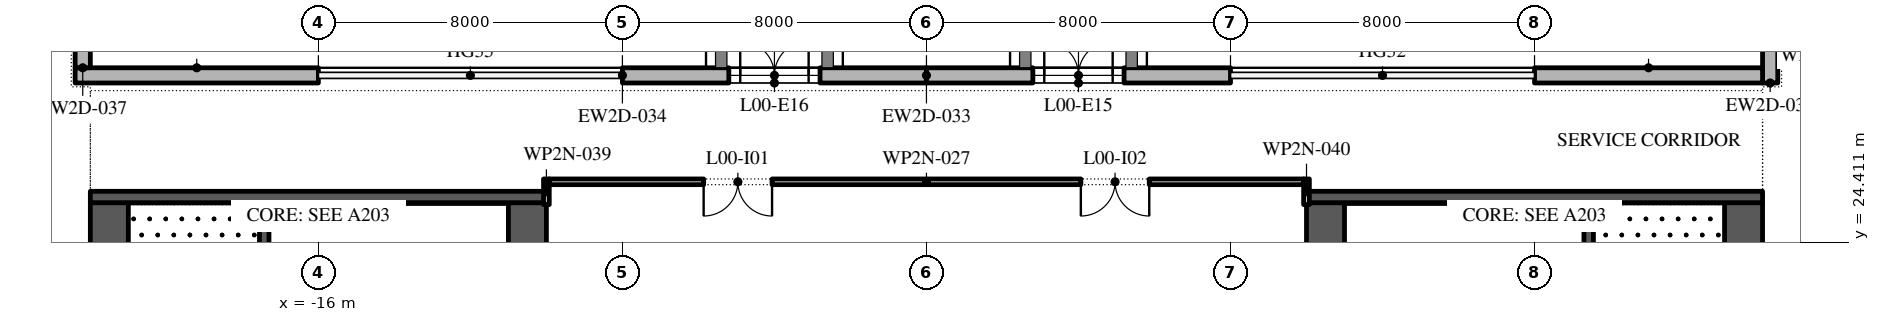
"""IFC4 building model, lengths in metres.
Left out: names, types, materials, properties, quantities, classifications, styles, units other than length and angle.
Written with IfcOpenShell. Run it as: python <this file> out.ifc"""

import sys

from ifc_helpers import new_model, si_unit, direction, frame, frame_2d, origin, place, context, subcontext, project, spatial, polyline, rectangle, outline, extrude, element, fill, save


model = new_model("IFC4")
c1 = context("Model", 3, precision=1e-05, world=origin(), true_north=direction((0.0, 1.0)))
c2 = subcontext(c1, "Body", "Model", "MODEL_VIEW")
j1 = project(units=[si_unit("LENGTHUNIT", "METRE"), si_unit("PLANEANGLEUNIT", "RADIAN")], contexts=[c1])
p1 = place(None, origin())
s1 = spatial("IfcSite", under=j1, at=p1, CompositionType="ELEMENT")
p2 = place(p1, origin())
s2 = spatial("IfcBuilding", under=s1, at=p2, CompositionType="ELEMENT")
p3 = place(p2, origin())
s3 = spatial("IfcBuildingStorey", under=s2, at=p3, CompositionType="ELEMENT", Elevation=0.0)
p4 = place(p3, frame((22.2, 32.0, 0.0), z_axis=(0.0, 0.0, 1.0), x_axis=(0.0, -1.0, 0.0)))
e1 = element("IfcWall", 1, at=p4, inside=s3, PredefinedType="STANDARD", context=c2, shape_type="SweptSolid", body=[
    extrude(rectangle(XDim=3.4, YDim=0.4, at=frame_2d((1.7, 0.0))), origin(), (0.0, 0.0, 1.0), 7.7),
])
p5 = place(p3, frame((22.0, 28.8, 0.0), z_axis=(0.0, 0.0, 1.0), x_axis=(-1.0, 0.0, 0.0)))
e2 = element("IfcWall", 2, at=p5, inside=s3, PredefinedType="STANDARD", context=c2, shape_type="SweptSolid", body=[
    extrude(rectangle(XDim=6.0, YDim=0.4, at=frame_2d((3.0, 0.0))), origin(), (0.0, 0.0, 1.0), 7.7),
])
p6 = place(p3, frame((8.0, 28.8, 0.0), z_axis=(0.0, 0.0, 1.0), x_axis=(-1.0, 0.0, 0.0)))
e3 = element("IfcWall", 3, at=p6, inside=s3, PredefinedType="STANDARD", context=c2, shape_type="SweptSolid", body=[
    extrude(rectangle(XDim=8.0, YDim=0.4, at=frame_2d((4.0, 0.0))), origin(), (0.0, 0.0, 1.0), 7.7),
])
p7 = place(p6, frame((3.1, 0.0, 0.0)))
e4 = element("IfcOpeningElement", 4, at=p7, cuts=e3, PredefinedType="OPENING", context=c2, shape_type="SweptSolid", body=[
    extrude(rectangle(XDim=1.8, YDim=2.7, at=frame_2d((0.9, 1.35))), frame((0.0, 0.21, 0.0), z_axis=(0.0, -1.0, 0.0), x_axis=(1.0, 0.0, 0.0)), (0.0, 0.0, 1.0), 0.42),
])
p8 = place(p6, frame((2.8, 0.0, 3.7)))
e5 = element("IfcOpeningElement", 5, at=p8, cuts=e3, PredefinedType="OPENING", context=c2, shape_type="SweptSolid", body=[
    extrude(outline(polyline([(0.0, 0.0), (2.4, 0.0), (2.4, 1.55), (2.378, 1.812), (2.314, 2.068), (2.208, 2.309), (2.065, 2.53), (1.887, 2.724), (1.68, 2.887), (1.449, 3.013), (1.2, 3.1), (0.951, 3.013), (0.72, 2.887), (0.513, 2.724), (0.335, 2.53), (0.191, 2.309), (0.086, 2.068), (0.022, 1.812), (0.0, 1.55), (0.0, 0.0)])), frame((0.0, 0.21, 0.0), z_axis=(0.0, -1.0, 0.0), x_axis=(1.0, 0.0, 0.0)), (0.0, 0.0, 1.0), 0.42),
])
p9 = place(p3, frame((0.0, 28.8, 0.0), z_axis=(0.0, 0.0, 1.0), x_axis=(-1.0, 0.0, 0.0)))
e6 = element("IfcWall", 6, at=p9, inside=s3, PredefinedType="STANDARD", context=c2, shape_type="SweptSolid", body=[
    extrude(rectangle(XDim=8.0, YDim=0.4, at=frame_2d((4.0, 0.0))), origin(), (0.0, 0.0, 1.0), 7.7),
])
p10 = place(p9, frame((3.1, 0.0, 0.0)))
e7 = element("IfcOpeningElement", 7, at=p10, cuts=e6, PredefinedType="OPENING", context=c2, shape_type="SweptSolid", body=[
    extrude(rectangle(XDim=1.8, YDim=2.7, at=frame_2d((0.9, 1.35))), frame((0.0, 0.21, 0.0), z_axis=(0.0, -1.0, 0.0), x_axis=(1.0, 0.0, 0.0)), (0.0, 0.0, 1.0), 0.42),
])
p11 = place(p9, frame((2.8, 0.0, 3.7)))
e8 = element("IfcOpeningElement", 8, at=p11, cuts=e6, PredefinedType="OPENING", context=c2, shape_type="SweptSolid", body=[
    extrude(outline(polyline([(0.0, 0.0), (2.4, 0.0), (2.4, 1.55), (2.378, 1.812), (2.314, 2.068), (2.208, 2.309), (2.065, 2.53), (1.887, 2.724), (1.68, 2.887), (1.449, 3.013), (1.2, 3.1), (0.951, 3.013), (0.72, 2.887), (0.513, 2.724), (0.335, 2.53), (0.191, 2.309), (0.086, 2.068), (0.022, 1.812), (0.0, 1.55), (0.0, 0.0)])), frame((0.0, 0.21, 0.0), z_axis=(0.0, -1.0, 0.0), x_axis=(1.0, 0.0, 0.0)), (0.0, 0.0, 1.0), 0.42),
])
p12 = place(p3, frame((-16.0, 28.8, 0.0), z_axis=(0.0, 0.0, 1.0), x_axis=(-1.0, 0.0, 0.0)))
e9 = element("IfcWall", 9, at=p12, inside=s3, PredefinedType="STANDARD", context=c2, shape_type="SweptSolid", body=[
    extrude(rectangle(XDim=6.4, YDim=0.4, at=frame_2d((3.2, 0.0))), origin(), (0.0, 0.0, 1.0), 7.7),
])
p13 = place(p3, frame((-22.2, 29.0, 0.0), z_axis=(0.0, 0.0, 1.0), x_axis=(0.0, 1.0, 0.0)))
e10 = element("IfcWall", 10, at=p13, inside=s3, PredefinedType="STANDARD", context=c2, shape_type="SweptSolid", body=[
    extrude(rectangle(XDim=3.0, YDim=0.4, at=frame_2d((1.5, 0.0))), origin(), (0.0, 0.0, 1.0), 7.7),
])
p14 = place(p3, frame((-21.5, -2.45, 0.0), z_axis=(0.0, 0.0, 1.0), x_axis=(0.0, 1.0, 0.0)))
e11 = element("IfcWall", 11, at=p14, inside=s3, PredefinedType="SHEAR", context=c2, shape_type="SweptSolid", body=[
    extrude(rectangle(XDim=27.9, YDim=1.0, at=frame_2d((13.95, 0.0))), origin(), (0.0, 0.0, 1.0), 7.7),
])
p15 = place(p14, frame((5.05, 0.0, 0.0)))
e12 = element("IfcOpeningElement", 12, at=p15, cuts=e11, PredefinedType="OPENING", context=c2, shape_type="SweptSolid", body=[
    extrude(rectangle(XDim=1.2, YDim=2.1, at=frame_2d((0.6, 1.05))), frame((0.0, 0.51, 0.0), z_axis=(0.0, -1.0, 0.0), x_axis=(1.0, 0.0, 0.0)), (0.0, 0.0, 1.0), 1.02),
])
p16 = place(p14, frame((21.65, 0.0, 0.0)))
e13 = element("IfcOpeningElement", 13, at=p16, cuts=e11, PredefinedType="OPENING", context=c2, shape_type="SweptSolid", body=[
    extrude(rectangle(XDim=1.2, YDim=2.1, at=frame_2d((0.6, 1.05))), frame((0.0, 0.51, 0.0), z_axis=(0.0, -1.0, 0.0), x_axis=(1.0, 0.0, 0.0)), (0.0, 0.0, 1.0), 1.02),
])
p17 = place(p3, frame((-10.5, -2.45, 0.0), z_axis=(0.0, 0.0, 1.0), x_axis=(0.0, 1.0, 0.0)))
e14 = element("IfcWall", 14, at=p17, inside=s3, PredefinedType="SHEAR", context=c2, shape_type="SweptSolid", body=[
    extrude(rectangle(XDim=27.9, YDim=1.0, at=frame_2d((13.95, 0.0))), origin(), (0.0, 0.0, 1.0), 7.7),
])
p18 = place(p17, frame((23.65, 0.0, 0.0)))
e15 = element("IfcOpeningElement", 15, at=p18, cuts=e14, PredefinedType="OPENING", context=c2, shape_type="SweptSolid", body=[
    extrude(rectangle(XDim=2.4, YDim=2.1, at=frame_2d((1.2, 1.05))), frame((0.0, 0.51, 0.0), z_axis=(0.0, -1.0, 0.0), x_axis=(1.0, 0.0, 0.0)), (0.0, 0.0, 1.0), 1.02),
])
p19 = place(p17, frame((1.087, 0.0, 0.0)))
e16 = element("IfcOpeningElement", 16, at=p19, cuts=e14, PredefinedType="OPENING", context=c2, shape_type="SweptSolid", body=[
    extrude(rectangle(XDim=0.9, YDim=2.1, at=frame_2d((0.45, 1.05))), frame((0.0, 0.51, 0.0), z_axis=(0.0, -1.0, 0.0), x_axis=(1.0, 0.0, 0.0)), (0.0, 0.0, 1.0), 1.02),
])
p20 = place(p17, frame((4.312, 0.0, 0.0)))
e17 = element("IfcOpeningElement", 17, at=p20, cuts=e14, PredefinedType="OPENING", context=c2, shape_type="SweptSolid", body=[
    extrude(rectangle(XDim=0.9, YDim=2.1, at=frame_2d((0.45, 1.05))), frame((0.0, 0.51, 0.0), z_axis=(0.0, -1.0, 0.0), x_axis=(1.0, 0.0, 0.0)), (0.0, 0.0, 1.0), 1.02),
])
p21 = place(p3, frame((-22.0, 25.6, 0.0), z_axis=(0.0, 0.0, 1.0), x_axis=(1.0, 0.0, 0.0)))
e18 = element("IfcWall", 18, at=p21, inside=s3, PredefinedType="SHEAR", context=c2, shape_type="SweptSolid", body=[
    extrude(rectangle(XDim=12.0, YDim=0.3, at=frame_2d((6.0, 0.0))), origin(), (0.0, 0.0, 1.0), 7.7),
])
p22 = place(p3, frame((-17.425, 19.15, 0.0), z_axis=(0.0, 0.0, 1.0), x_axis=(0.0, 1.0, 0.0)))
e19 = element("IfcWall", 19, at=p22, inside=s3, PredefinedType="SHEAR", context=c2, shape_type="SweptSolid", body=[
    extrude(rectangle(XDim=6.3, YDim=0.25, at=frame_2d((3.15, 0.0))), origin(), (0.0, 0.0, 1.0), 7.7),
])
p23 = place(p22, frame((0.05, 0.0, 0.0)))
e20 = element("IfcOpeningElement", 20, at=p23, cuts=e19, PredefinedType="OPENING", context=c2, shape_type="SweptSolid", body=[
    extrude(rectangle(XDim=1.2, YDim=2.1, at=frame_2d((0.6, 1.05))), frame((0.0, 0.135, 0.0), z_axis=(0.0, -1.0, 0.0), x_axis=(1.0, 0.0, 0.0)), (0.0, 0.0, 1.0), 0.27),
])
p24 = place(p3, frame((21.5, -2.45, 0.0), z_axis=(0.0, 0.0, 1.0), x_axis=(0.0, 1.0, 0.0)))
e21 = element("IfcWall", 21, at=p24, inside=s3, PredefinedType="SHEAR", context=c2, shape_type="SweptSolid", body=[
    extrude(rectangle(XDim=27.9, YDim=1.0, at=frame_2d((13.95, 0.0))), origin(), (0.0, 0.0, 1.0), 7.7),
])
p25 = place(p24, frame((5.05, 0.0, 0.0)))
e22 = element("IfcOpeningElement", 22, at=p25, cuts=e21, PredefinedType="OPENING", context=c2, shape_type="SweptSolid", body=[
    extrude(rectangle(XDim=1.2, YDim=2.1, at=frame_2d((0.6, 1.05))), frame((0.0, 0.51, 0.0), z_axis=(0.0, -1.0, 0.0), x_axis=(1.0, 0.0, 0.0)), (0.0, 0.0, 1.0), 1.02),
])
p26 = place(p24, frame((21.65, 0.0, 0.0)))
e23 = element("IfcOpeningElement", 23, at=p26, cuts=e21, PredefinedType="OPENING", context=c2, shape_type="SweptSolid", body=[
    extrude(rectangle(XDim=1.2, YDim=2.1, at=frame_2d((0.6, 1.05))), frame((0.0, 0.51, 0.0), z_axis=(0.0, -1.0, 0.0), x_axis=(1.0, 0.0, 0.0)), (0.0, 0.0, 1.0), 1.02),
])
p27 = place(p3, frame((10.5, -2.45, 0.0), z_axis=(0.0, 0.0, 1.0), x_axis=(0.0, 1.0, 0.0)))
e24 = element("IfcWall", 24, at=p27, inside=s3, PredefinedType="SHEAR", context=c2, shape_type="SweptSolid", body=[
    extrude(rectangle(XDim=27.9, YDim=1.0, at=frame_2d((13.95, 0.0))), origin(), (0.0, 0.0, 1.0), 7.7),
])
p28 = place(p27, frame((23.65, 0.0, 0.0)))
e25 = element("IfcOpeningElement", 25, at=p28, cuts=e24, PredefinedType="OPENING", context=c2, shape_type="SweptSolid", body=[
    extrude(rectangle(XDim=2.4, YDim=2.1, at=frame_2d((1.2, 1.05))), frame((0.0, 0.51, 0.0), z_axis=(0.0, -1.0, 0.0), x_axis=(1.0, 0.0, 0.0)), (0.0, 0.0, 1.0), 1.02),
])
p29 = place(p27, frame((2.7, 0.0, 0.0)))
e26 = element("IfcOpeningElement", 26, at=p29, cuts=e24, PredefinedType="OPENING", context=c2, shape_type="SweptSolid", body=[
    extrude(rectangle(XDim=0.9, YDim=2.1, at=frame_2d((0.45, 1.05))), frame((0.0, 0.51, 0.0), z_axis=(0.0, -1.0, 0.0), x_axis=(1.0, 0.0, 0.0)), (0.0, 0.0, 1.0), 1.02),
])
p30 = place(p3, frame((10.0, 25.6, 0.0), z_axis=(0.0, 0.0, 1.0), x_axis=(1.0, 0.0, 0.0)))
e27 = element("IfcWall", 27, at=p30, inside=s3, PredefinedType="SHEAR", context=c2, shape_type="SweptSolid", body=[
    extrude(rectangle(XDim=12.0, YDim=0.3, at=frame_2d((6.0, 0.0))), origin(), (0.0, 0.0, 1.0), 7.7),
])
p31 = place(p3, frame((17.425, 19.15, 0.0), z_axis=(0.0, 0.0, 1.0), x_axis=(0.0, 1.0, 0.0)))
e28 = element("IfcWall", 28, at=p31, inside=s3, PredefinedType="SHEAR", context=c2, shape_type="SweptSolid", body=[
    extrude(rectangle(XDim=6.3, YDim=0.25, at=frame_2d((3.15, 0.0))), origin(), (0.0, 0.0, 1.0), 7.7),
])
p32 = place(p31, frame((0.05, 0.0, 0.0)))
e29 = element("IfcOpeningElement", 29, at=p32, cuts=e28, PredefinedType="OPENING", context=c2, shape_type="SweptSolid", body=[
    extrude(rectangle(XDim=1.2, YDim=2.1, at=frame_2d((0.6, 1.05))), frame((0.0, 0.135, 0.0), z_axis=(0.0, -1.0, 0.0), x_axis=(1.0, 0.0, 0.0)), (0.0, 0.0, 1.0), 0.27),
])
p33 = place(p3, frame((-9.925, 26.0, 0.0), z_axis=(0.0, 0.0, 1.0), x_axis=(1.0, 0.0, 0.0)))
e30 = element("IfcWall", 30, at=p33, inside=s3, PredefinedType="PARTITIONING", context=c2, shape_type="SweptSolid", body=[
    extrude(rectangle(XDim=19.85, YDim=0.15, at=frame_2d((9.925, 0.0))), origin(), (0.0, 0.0, 1.0), 7.7),
])
p34 = place(p33, frame((4.062, 0.0, 0.0)))
e31 = element("IfcOpeningElement", 31, at=p34, cuts=e30, PredefinedType="OPENING", context=c2, shape_type="SweptSolid", body=[
    extrude(rectangle(XDim=1.8, YDim=2.1, at=frame_2d((0.9, 1.05))), frame((0.0, 0.085, 0.0), z_axis=(0.0, -1.0, 0.0), x_axis=(1.0, 0.0, 0.0)), (0.0, 0.0, 1.0), 0.17),
])
p35 = place(p33, frame((13.988, 0.0, 0.0)))
e32 = element("IfcOpeningElement", 32, at=p35, cuts=e30, PredefinedType="OPENING", context=c2, shape_type="SweptSolid", body=[
    extrude(rectangle(XDim=1.8, YDim=2.1, at=frame_2d((0.9, 1.05))), frame((0.0, 0.085, 0.0), z_axis=(0.0, -1.0, 0.0), x_axis=(1.0, 0.0, 0.0)), (0.0, 0.0, 1.0), 0.17),
])
for number, where, z_axis, x_axis in (
    (33, (-10.0, 25.4, 0.0), (0.0, 0.0, 1.0), (0.0, 1.0, 0.0)),
    (34, (10.0, 25.4, 0.0), (0.0, 0.0, 1.0), (0.0, 1.0, 0.0)),
):
    element("IfcWall", number, at=place(p3, frame(where, z_axis=z_axis, x_axis=x_axis)), inside=s3, PredefinedType="PARTITIONING", context=c2, shape_type="SweptSolid", body=[
        extrude(rectangle(XDim=0.675, YDim=0.15, at=frame_2d((0.337, 0.0))), origin(), (0.0, 0.0, 1.0), 7.7),
    ])
p36 = place(p7, frame((1.8, 0.0, 0.0), z_axis=(0.0, 0.0, 1.0), x_axis=(-1.0, 0.0, 0.0)))
e35 = element("IfcDoor", 35, at=p36, inside=s3, OperationType="DOUBLE_DOOR_SINGLE_SWING", PredefinedType="DOOR", context=c2, shape_type="SweptSolid", body=[
    extrude(rectangle(XDim=1.8, YDim=2.7, at=frame_2d((0.9, 1.35))), frame((0.0, 0.025, 0.0), z_axis=(0.0, -1.0, 0.0), x_axis=(1.0, 0.0, 0.0)), (0.0, 0.0, 1.0), 0.05),
])
fill(e4, e35)
p37 = place(p8, origin())
e36 = element("IfcWindow", 36, at=p37, inside=s3, PartitioningType="DOUBLE_PANEL_VERTICAL", PredefinedType="WINDOW", context=c2, shape_type="SweptSolid", body=[
    extrude(outline(polyline([(0.0, 0.0), (2.4, 0.0), (2.4, 1.55), (2.378, 1.812), (2.314, 2.068), (2.208, 2.309), (2.065, 2.53), (1.887, 2.724), (1.68, 2.887), (1.449, 3.013), (1.2, 3.1), (0.951, 3.013), (0.72, 2.887), (0.513, 2.724), (0.335, 2.53), (0.191, 2.309), (0.086, 2.068), (0.022, 1.812), (0.0, 1.55), (0.0, 0.0)])), frame((0.0, 0.03, 0.0), z_axis=(0.0, -1.0, 0.0), x_axis=(1.0, 0.0, 0.0)), (0.0, 0.0, 1.0), 0.06),
])
fill(e5, e36)
p38 = place(p10, frame((1.8, 0.0, 0.0), z_axis=(0.0, 0.0, 1.0), x_axis=(-1.0, 0.0, 0.0)))
e37 = element("IfcDoor", 37, at=p38, inside=s3, OperationType="DOUBLE_DOOR_SINGLE_SWING", PredefinedType="DOOR", context=c2, shape_type="SweptSolid", body=[
    extrude(rectangle(XDim=1.8, YDim=2.7, at=frame_2d((0.9, 1.35))), frame((0.0, 0.025, 0.0), z_axis=(0.0, -1.0, 0.0), x_axis=(1.0, 0.0, 0.0)), (0.0, 0.0, 1.0), 0.05),
])
fill(e7, e37)
p39 = place(p11, origin())
e38 = element("IfcWindow", 38, at=p39, inside=s3, PartitioningType="DOUBLE_PANEL_VERTICAL", PredefinedType="WINDOW", context=c2, shape_type="SweptSolid", body=[
    extrude(outline(polyline([(0.0, 0.0), (2.4, 0.0), (2.4, 1.55), (2.378, 1.812), (2.314, 2.068), (2.208, 2.309), (2.065, 2.53), (1.887, 2.724), (1.68, 2.887), (1.449, 3.013), (1.2, 3.1), (0.951, 3.013), (0.72, 2.887), (0.513, 2.724), (0.335, 2.53), (0.191, 2.309), (0.086, 2.068), (0.022, 1.812), (0.0, 1.55), (0.0, 0.0)])), frame((0.0, 0.03, 0.0), z_axis=(0.0, -1.0, 0.0), x_axis=(1.0, 0.0, 0.0)), (0.0, 0.0, 1.0), 0.06),
])
fill(e8, e38)
p40 = place(p34, frame((1.8, 0.0, 0.0), z_axis=(0.0, 0.0, 1.0), x_axis=(-1.0, 0.0, 0.0)))
e39 = element("IfcDoor", 39, at=p40, inside=s3, OperationType="SINGLE_SWING_RIGHT", PredefinedType="DOOR", context=c2, shape_type="SweptSolid", body=[
    extrude(rectangle(XDim=1.8, YDim=2.1, at=frame_2d((0.9, 1.05))), frame((0.0, 0.025, 0.0), z_axis=(0.0, -1.0, 0.0), x_axis=(1.0, 0.0, 0.0)), (0.0, 0.0, 1.0), 0.05),
])
fill(e31, e39)
p41 = place(p35, frame((1.8, 0.0, 0.0), z_axis=(0.0, 0.0, 1.0), x_axis=(-1.0, 0.0, 0.0)))
e40 = element("IfcDoor", 40, at=p41, inside=s3, OperationType="SINGLE_SWING_RIGHT", PredefinedType="DOOR", context=c2, shape_type="SweptSolid", body=[
    extrude(rectangle(XDim=1.8, YDim=2.1, at=frame_2d((0.9, 1.05))), frame((0.0, 0.025, 0.0), z_axis=(0.0, -1.0, 0.0), x_axis=(1.0, 0.0, 0.0)), (0.0, 0.0, 1.0), 0.05),
])
fill(e32, e40)
save(model, sys.argv[1])
